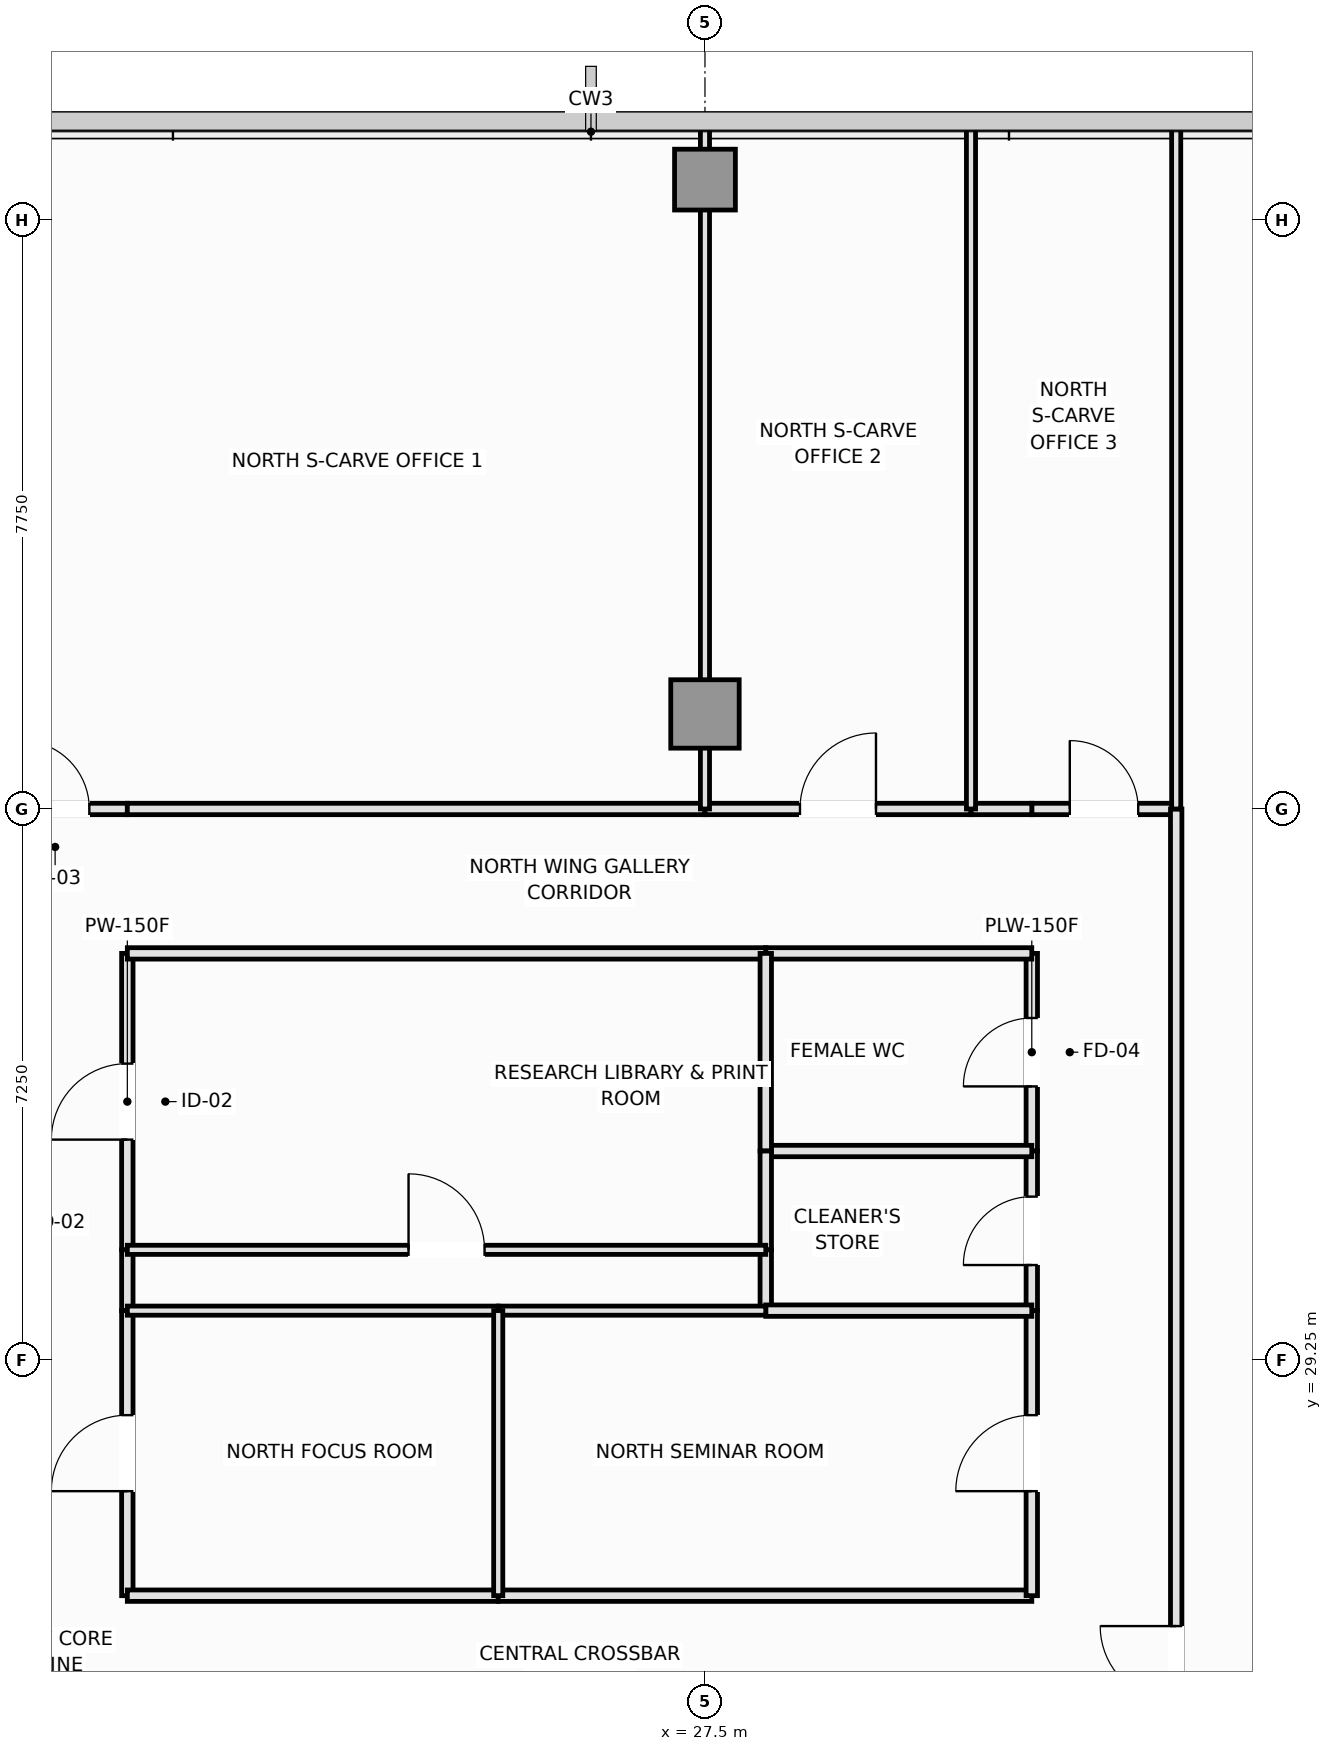
"""IFC4 building model, lengths in metres.
Left out: names, types, materials, properties, quantities, classifications, styles, units other than length and angle.
Written with IfcOpenShell. Run it as: python <this file> out.ifc"""

import sys

from ifc_helpers import new_model, si_unit, direction, frame, frame_2d, origin, origin_2d, place, context, subcontext, project, spatial, rectangle, extrude, element, fill, save


model = new_model("IFC4")
c1 = context("Model", 3, precision=1e-05, world=origin(), true_north=direction((0.0, 1.0)))
c2 = subcontext(c1, "Body", "Model", "MODEL_VIEW")
j1 = project(units=[si_unit("LENGTHUNIT", "METRE"), si_unit("PLANEANGLEUNIT", "RADIAN")], contexts=[c1])
p1 = place(None, origin())
s1 = spatial("IfcSite", under=j1, at=p1, CompositionType="ELEMENT")
p2 = place(p1, origin())
s2 = spatial("IfcBuilding", under=s1, at=p2, CompositionType="ELEMENT")
p3 = place(p2, frame((0.0, 0.0, 212.9)))
s3 = spatial("IfcBuildingStorey", under=s2, at=p3, CompositionType="ELEMENT", Elevation=212.9)
p4 = place(p3, frame((27.5, 37.75, 0.0), z_axis=(0.0, 0.0, 1.0), x_axis=(1.0, 0.0, 0.0)))
e1 = element("IfcColumn", 1, at=p4, inside=s3, PredefinedType="COLUMN", context=c2, shape_type="SweptSolid", body=[
    extrude(rectangle(XDim=0.9, YDim=0.9, at=origin_2d()), origin(), (0.0, 0.0, 1.0), 3.55),
])
p5 = place(p3, frame((27.5, 44.78, 0.0), z_axis=(0.0, 0.0, 1.0), x_axis=(1.0, 0.0, 0.0)))
e2 = element("IfcColumn", 2, at=p5, inside=s3, PredefinedType="COLUMN", context=c2, shape_type="SweptSolid", body=[
    extrude(rectangle(XDim=0.8, YDim=0.8, at=origin_2d()), origin(), (0.0, 0.0, 1.0), 3.55),
])
p6 = place(p3, frame((19.9, 30.7, 0.0), z_axis=(0.0, 0.0, 1.0), x_axis=(0.0, 1.0, 0.0)))
e3 = element("IfcWall", 3, at=p6, inside=s3, PredefinedType="PARTITIONING", context=c2, shape_type="SweptSolid", body=[
    extrude(rectangle(XDim=3.9, YDim=0.15, at=frame_2d((1.95, 0.0))), origin(), (0.0, 0.0, 1.0), 3.37),
])
p7 = place(p6, frame((1.45, 0.0, 0.0)))
e4 = element("IfcOpeningElement", 4, at=p7, cuts=e3, PredefinedType="OPENING", context=c2, shape_type="SweptSolid", body=[
    extrude(rectangle(XDim=1.0, YDim=2.15, at=frame_2d((0.5, 1.075))), frame((0.0, 0.085, 0.0), z_axis=(0.0, -1.0, 0.0), x_axis=(1.0, 0.0, 0.0)), (0.0, 0.0, 1.0), 0.17),
])
p8 = place(p3, frame((19.9, 29.9, 0.0), z_axis=(0.0, 0.0, 1.0), x_axis=(0.0, 1.0, 0.0)))
e5 = element("IfcWall", 5, at=p8, inside=s3, PredefinedType="PARTITIONING", context=c2, shape_type="SweptSolid", body=[
    extrude(rectangle(XDim=0.8, YDim=0.15, at=frame_2d((0.4, 0.0))), origin(), (0.0, 0.0, 1.0), 3.37),
])
p9 = place(p3, frame((19.9, 26.15, 0.0), z_axis=(0.0, 0.0, 1.0), x_axis=(0.0, 1.0, 0.0)))
e6 = element("IfcWall", 6, at=p9, inside=s3, PredefinedType="PARTITIONING", context=c2, shape_type="SweptSolid", body=[
    extrude(rectangle(XDim=3.75, YDim=0.15, at=frame_2d((1.875, 0.0))), origin(), (0.0, 0.0, 1.0), 3.37),
])
p10 = place(p9, frame((1.375, 0.0, 0.0)))
e7 = element("IfcOpeningElement", 7, at=p10, cuts=e6, PredefinedType="OPENING", context=c2, shape_type="SweptSolid", body=[
    extrude(rectangle(XDim=1.0, YDim=2.15, at=frame_2d((0.5, 1.075))), frame((0.0, 0.085, 0.0), z_axis=(0.0, -1.0, 0.0), x_axis=(1.0, 0.0, 0.0)), (0.0, 0.0, 1.0), 0.17),
])
p11 = place(p3, frame((18.0, 36.5, 0.0), z_axis=(0.0, 0.0, 1.0), x_axis=(1.0, 0.0, 0.0)))
e8 = element("IfcWall", 8, at=p11, inside=s3, PredefinedType="PARTITIONING", context=c2, shape_type="SweptSolid", body=[
    extrude(rectangle(XDim=1.9, YDim=0.15, at=frame_2d((0.95, 0.0))), origin(), (0.0, 0.0, 1.0), 3.37),
])
p12 = place(p11, frame((0.5, 0.0, 0.0)))
e9 = element("IfcOpeningElement", 9, at=p12, cuts=e8, PredefinedType="OPENING", context=c2, shape_type="SweptSolid", body=[
    extrude(rectangle(XDim=0.9, YDim=2.1, at=frame_2d((0.45, 1.05))), frame((0.0, 0.085, 0.0), z_axis=(0.0, -1.0, 0.0), x_axis=(1.0, 0.0, 0.0)), (0.0, 0.0, 1.0), 0.17),
])
p13 = place(p3, frame((19.9, 26.15, 0.0), z_axis=(0.0, 0.0, 1.0), x_axis=(1.0, 0.0, 0.0)))
e10 = element("IfcWall", 10, at=p13, inside=s3, PredefinedType="PARTITIONING", context=c2, shape_type="SweptSolid", body=[
    extrude(rectangle(XDim=4.88, YDim=0.15, at=frame_2d((2.44, 0.0))), origin(), (0.0, 0.0, 1.0), 3.37),
])
p14 = place(p3, frame((24.78, 26.15, 0.0), z_axis=(0.0, 0.0, 1.0), x_axis=(1.0, 0.0, 0.0)))
e11 = element("IfcWall", 11, at=p14, inside=s3, PredefinedType="PARTITIONING", context=c2, shape_type="SweptSolid", body=[
    extrude(rectangle(XDim=7.02, YDim=0.15, at=frame_2d((3.51, 0.0))), origin(), (0.0, 0.0, 1.0), 3.37),
])
p15 = place(p3, frame((31.8, 32.0, 0.0), z_axis=(0.0, 0.0, 1.0), x_axis=(0.0, 1.0, 0.0)))
e12 = element("IfcWall", 12, at=p15, inside=s3, PredefinedType="PLUMBINGWALL", context=c2, shape_type="SweptSolid", body=[
    extrude(rectangle(XDim=2.6, YDim=0.15, at=frame_2d((1.3, 0.0))), origin(), (0.0, 0.0, 1.0), 3.37),
])
p16 = place(p15, frame((0.85, 0.0, 0.0)))
e13 = element("IfcOpeningElement", 13, at=p16, cuts=e12, PredefinedType="OPENING", context=c2, shape_type="SweptSolid", body=[
    extrude(rectangle(XDim=0.9, YDim=2.1, at=frame_2d((0.45, 1.05))), frame((0.0, 0.085, 0.0), z_axis=(0.0, -1.0, 0.0), x_axis=(1.0, 0.0, 0.0)), (0.0, 0.0, 1.0), 0.17),
])
p17 = place(p3, frame((31.8, 29.9, 0.0), z_axis=(0.0, 0.0, 1.0), x_axis=(0.0, 1.0, 0.0)))
e14 = element("IfcWall", 14, at=p17, inside=s3, PredefinedType="PLUMBINGWALL", context=c2, shape_type="SweptSolid", body=[
    extrude(rectangle(XDim=2.1, YDim=0.15, at=frame_2d((1.05, 0.0))), origin(), (0.0, 0.0, 1.0), 3.37),
])
p18 = place(p17, frame((0.6, 0.0, 0.0)))
e15 = element("IfcOpeningElement", 15, at=p18, cuts=e14, PredefinedType="OPENING", context=c2, shape_type="SweptSolid", body=[
    extrude(rectangle(XDim=0.9, YDim=2.1, at=frame_2d((0.45, 1.05))), frame((0.0, 0.085, 0.0), z_axis=(0.0, -1.0, 0.0), x_axis=(1.0, 0.0, 0.0)), (0.0, 0.0, 1.0), 0.17),
])
p19 = place(p3, frame((31.8, 26.15, 0.0), z_axis=(0.0, 0.0, 1.0), x_axis=(0.0, 1.0, 0.0)))
e16 = element("IfcWall", 16, at=p19, inside=s3, PredefinedType="PARTITIONING", context=c2, shape_type="SweptSolid", body=[
    extrude(rectangle(XDim=3.75, YDim=0.15, at=frame_2d((1.875, 0.0))), origin(), (0.0, 0.0, 1.0), 3.37),
])
p20 = place(p19, frame((1.375, 0.0, 0.0)))
e17 = element("IfcOpeningElement", 17, at=p20, cuts=e16, PredefinedType="OPENING", context=c2, shape_type="SweptSolid", body=[
    extrude(rectangle(XDim=1.0, YDim=2.15, at=frame_2d((0.5, 1.075))), frame((0.0, 0.085, 0.0), z_axis=(0.0, -1.0, 0.0), x_axis=(1.0, 0.0, 0.0)), (0.0, 0.0, 1.0), 0.17),
])
p21 = place(p3, frame((31.8, 36.5, 0.0), z_axis=(0.0, 0.0, 1.0), x_axis=(1.0, 0.0, 0.0)))
e18 = element("IfcWall", 18, at=p21, inside=s3, PredefinedType="PARTITIONING", context=c2, shape_type="SweptSolid", body=[
    extrude(rectangle(XDim=1.9, YDim=0.15, at=frame_2d((0.95, 0.0))), origin(), (0.0, 0.0, 1.0), 3.37),
])
p22 = place(p21, frame((0.5, 0.0, 0.0)))
e19 = element("IfcOpeningElement", 19, at=p22, cuts=e18, PredefinedType="OPENING", context=c2, shape_type="SweptSolid", body=[
    extrude(rectangle(XDim=0.9, YDim=2.1, at=frame_2d((0.45, 1.05))), frame((0.0, 0.085, 0.0), z_axis=(0.0, -1.0, 0.0), x_axis=(1.0, 0.0, 0.0)), (0.0, 0.0, 1.0), 0.17),
])
p23 = place(p3, frame((33.7, 14.0, 0.0), z_axis=(0.0, 0.0, 1.0), x_axis=(0.0, 1.0, 0.0)))
e20 = element("IfcWall", 20, at=p23, inside=s3, PredefinedType="PARTITIONING", context=c2, shape_type="SweptSolid", body=[
    extrude(rectangle(XDim=22.5, YDim=0.15, at=frame_2d((11.25, 0.0))), origin(), (0.0, 0.0, 1.0), 3.37),
])
p24 = place(p23, frame((10.75, 0.0, 0.0)))
e21 = element("IfcOpeningElement", 21, at=p24, cuts=e20, PredefinedType="OPENING", context=c2, shape_type="SweptSolid", body=[
    extrude(rectangle(XDim=1.0, YDim=2.15, at=frame_2d((0.5, 1.075))), frame((0.0, 0.085, 0.0), z_axis=(0.0, -1.0, 0.0), x_axis=(1.0, 0.0, 0.0)), (0.0, 0.0, 1.0), 0.17),
])
p25 = place(p3, frame((28.3, 34.6, 0.0), z_axis=(0.0, 0.0, 1.0), x_axis=(1.0, 0.0, 0.0)))
e22 = element("IfcWall", 22, at=p25, inside=s3, PredefinedType="PLUMBINGWALL", context=c2, shape_type="SweptSolid", body=[
    extrude(rectangle(XDim=3.5, YDim=0.15, at=frame_2d((1.75, 0.0))), origin(), (0.0, 0.0, 1.0), 3.37),
])
p26 = place(p3, frame((19.9, 34.6, 0.0), z_axis=(0.0, 0.0, 1.0), x_axis=(1.0, 0.0, 0.0)))
e23 = element("IfcWall", 23, at=p26, inside=s3, PredefinedType="PARTITIONING", context=c2, shape_type="SweptSolid", body=[
    extrude(rectangle(XDim=8.4, YDim=0.15, at=frame_2d((4.2, 0.0))), origin(), (0.0, 0.0, 1.0), 3.37),
])
p27 = place(p3, frame((19.9, 36.5, 0.0), z_axis=(0.0, 0.0, 1.0), x_axis=(1.0, 0.0, 0.0)))
e24 = element("IfcWall", 24, at=p27, inside=s3, PredefinedType="PARTITIONING", context=c2, shape_type="SweptSolid", body=[
    extrude(rectangle(XDim=7.6, YDim=0.15, at=frame_2d((3.8, 0.0))), origin(), (0.0, 0.0, 1.0), 3.37),
])
p28 = place(p3, frame((27.5, 36.5, 0.0), z_axis=(0.0, 0.0, 1.0), x_axis=(1.0, 0.0, 0.0)))
e25 = element("IfcWall", 25, at=p28, inside=s3, PredefinedType="PARTITIONING", context=c2, shape_type="SweptSolid", body=[
    extrude(rectangle(XDim=3.5, YDim=0.15, at=frame_2d((1.75, 0.0))), origin(), (0.0, 0.0, 1.0), 3.37),
])
p29 = place(p28, frame((1.25, 0.0, 0.0)))
e26 = element("IfcOpeningElement", 26, at=p29, cuts=e25, PredefinedType="OPENING", context=c2, shape_type="SweptSolid", body=[
    extrude(rectangle(XDim=1.0, YDim=2.15, at=frame_2d((0.5, 1.075))), frame((0.0, 0.085, 0.0), z_axis=(0.0, -1.0, 0.0), x_axis=(1.0, 0.0, 0.0)), (0.0, 0.0, 1.0), 0.17),
])
p30 = place(p3, frame((31.0, 36.5, 0.0), z_axis=(0.0, 0.0, 1.0), x_axis=(1.0, 0.0, 0.0)))
e27 = element("IfcWall", 27, at=p30, inside=s3, PredefinedType="PARTITIONING", context=c2, shape_type="SweptSolid", body=[
    extrude(rectangle(XDim=0.8, YDim=0.15, at=frame_2d((0.4, 0.0))), origin(), (0.0, 0.0, 1.0), 3.37),
])
p31 = place(p3, frame((28.3, 32.0, 0.0), z_axis=(0.0, 0.0, 1.0), x_axis=(1.0, 0.0, 0.0)))
e28 = element("IfcWall", 28, at=p31, inside=s3, PredefinedType="PLUMBINGWALL", context=c2, shape_type="SweptSolid", body=[
    extrude(rectangle(XDim=3.5, YDim=0.15, at=frame_2d((1.75, 0.0))), origin(), (0.0, 0.0, 1.0), 2.87),
])
p32 = place(p3, frame((28.3, 32.0, 0.0), z_axis=(0.0, 0.0, 1.0), x_axis=(0.0, 1.0, 0.0)))
e29 = element("IfcWall", 29, at=p32, inside=s3, PredefinedType="PLUMBINGWALL", context=c2, shape_type="SweptSolid", body=[
    extrude(rectangle(XDim=2.6, YDim=0.15, at=frame_2d((1.3, 0.0))), origin(), (0.0, 0.0, 1.0), 3.37),
])
p33 = place(p3, frame((28.3, 30.7, 0.0), z_axis=(0.0, 0.0, 1.0), x_axis=(0.0, 1.0, 0.0)))
e30 = element("IfcWall", 30, at=p33, inside=s3, PredefinedType="PLUMBINGWALL", context=c2, shape_type="SweptSolid", body=[
    extrude(rectangle(XDim=1.3, YDim=0.15, at=frame_2d((0.65, 0.0))), origin(), (0.0, 0.0, 1.0), 3.37),
])
p34 = place(p3, frame((28.3, 29.9, 0.0), z_axis=(0.0, 0.0, 1.0), x_axis=(0.0, 1.0, 0.0)))
e31 = element("IfcWall", 31, at=p34, inside=s3, PredefinedType="PLUMBINGWALL", context=c2, shape_type="SweptSolid", body=[
    extrude(rectangle(XDim=0.8, YDim=0.15, at=frame_2d((0.4, 0.0))), origin(), (0.0, 0.0, 1.0), 3.37),
])
p35 = place(p3, frame((28.3, 29.9, 0.0), z_axis=(0.0, 0.0, 1.0), x_axis=(1.0, 0.0, 0.0)))
e32 = element("IfcWall", 32, at=p35, inside=s3, PredefinedType="PLUMBINGWALL", context=c2, shape_type="SweptSolid", body=[
    extrude(rectangle(XDim=3.5, YDim=0.15, at=frame_2d((1.75, 0.0))), origin(), (0.0, 0.0, 1.0), 3.37),
])
p36 = place(p3, frame((19.9, 30.7, 0.0), z_axis=(0.0, 0.0, 1.0), x_axis=(1.0, 0.0, 0.0)))
e33 = element("IfcWall", 33, at=p36, inside=s3, PredefinedType="PARTITIONING", context=c2, shape_type="SweptSolid", body=[
    extrude(rectangle(XDim=8.4, YDim=0.12, at=frame_2d((4.2, 0.0))), origin(), (0.0, 0.0, 1.0), 3.37),
])
p37 = place(p36, frame((3.7, 0.0, 0.0)))
e34 = element("IfcOpeningElement", 34, at=p37, cuts=e33, PredefinedType="OPENING", context=c2, shape_type="SweptSolid", body=[
    extrude(rectangle(XDim=1.0, YDim=2.15, at=frame_2d((0.5, 1.075))), frame((0.0, 0.07, 0.0), z_axis=(0.0, -1.0, 0.0), x_axis=(1.0, 0.0, 0.0)), (0.0, 0.0, 1.0), 0.14),
])
p38 = place(p3, frame((19.9, 29.9, 0.0), z_axis=(0.0, 0.0, 1.0), x_axis=(1.0, 0.0, 0.0)))
e35 = element("IfcWall", 35, at=p38, inside=s3, PredefinedType="PARTITIONING", context=c2, shape_type="SweptSolid", body=[
    extrude(rectangle(XDim=4.88, YDim=0.12, at=frame_2d((2.44, 0.0))), origin(), (0.0, 0.0, 1.0), 3.37),
])
p39 = place(p3, frame((24.78, 29.9, 0.0), z_axis=(0.0, 0.0, 1.0), x_axis=(1.0, 0.0, 0.0)))
e36 = element("IfcWall", 36, at=p39, inside=s3, PredefinedType="PARTITIONING", context=c2, shape_type="SweptSolid", body=[
    extrude(rectangle(XDim=3.52, YDim=0.12, at=frame_2d((1.76, 0.0))), origin(), (0.0, 0.0, 1.0), 3.37),
])
p40 = place(p3, frame((24.78, 26.15, 0.0), z_axis=(0.0, 0.0, 1.0), x_axis=(0.0, 1.0, 0.0)))
e37 = element("IfcWall", 37, at=p40, inside=s3, PredefinedType="PARTITIONING", context=c2, shape_type="SweptSolid", body=[
    extrude(rectangle(XDim=3.75, YDim=0.12, at=frame_2d((1.875, 0.0))), origin(), (0.0, 0.0, 1.0), 3.37),
])
p41 = place(p3, frame((27.5, 36.5, 0.0), z_axis=(0.0, 0.0, 1.0), x_axis=(0.0, 1.0, 0.0)))
e38 = element("IfcWall", 38, at=p41, inside=s3, PredefinedType="PARTITIONING", context=c2, shape_type="SweptSolid", body=[
    extrude(rectangle(XDim=8.99, YDim=0.12, at=frame_2d((4.495, 0.0))), origin(), (0.0, 0.0, 1.0), 2.92),
])
for number, where, z_axis, x_axis in (
    (39, (31.0, 36.5, 0.0), (0.0, 0.0, 1.0), (0.0, 1.0, 0.0)),
    (40, (33.7, 36.5, 0.0), (0.0, 0.0, 1.0), (0.0, 1.0, 0.0)),
):
    element("IfcWall", number, at=place(p3, frame(where, z_axis=z_axis, x_axis=x_axis)), inside=s3, PredefinedType="PARTITIONING", context=c2, shape_type="SweptSolid", body=[
        extrude(rectangle(XDim=8.99, YDim=0.12, at=frame_2d((4.495, 0.0))), origin(), (0.0, 0.0, 1.0), 3.37),
    ])
p42 = place(p7, origin())
e41 = element("IfcDoor", 41, at=p42, inside=s3, OperationType="SINGLE_SWING_LEFT", PredefinedType="DOOR", context=c2, shape_type="SweptSolid", body=[
    extrude(rectangle(XDim=1.0, YDim=2.15, at=frame_2d((0.5, 1.075))), frame((0.0, 0.025, 0.0), z_axis=(0.0, -1.0, 0.0), x_axis=(1.0, 0.0, 0.0)), (0.0, 0.0, 1.0), 0.05),
])
fill(e4, e41)
p43 = place(p10, origin())
e42 = element("IfcDoor", 42, at=p43, inside=s3, OperationType="SINGLE_SWING_LEFT", PredefinedType="DOOR", context=c2, shape_type="SweptSolid", body=[
    extrude(rectangle(XDim=1.0, YDim=2.15, at=frame_2d((0.5, 1.075))), frame((0.0, 0.025, 0.0), z_axis=(0.0, -1.0, 0.0), x_axis=(1.0, 0.0, 0.0)), (0.0, 0.0, 1.0), 0.05),
])
fill(e7, e42)
p44 = place(p12, origin())
e43 = element("IfcDoor", 43, at=p44, inside=s3, OperationType="SINGLE_SWING_LEFT", PredefinedType="DOOR", context=c2, shape_type="SweptSolid", body=[
    extrude(rectangle(XDim=0.9, YDim=2.1, at=frame_2d((0.45, 1.05))), frame((0.0, 0.025, 0.0), z_axis=(0.0, -1.0, 0.0), x_axis=(1.0, 0.0, 0.0)), (0.0, 0.0, 1.0), 0.05),
])
fill(e9, e43)
p45 = place(p16, origin())
e44 = element("IfcDoor", 44, at=p45, inside=s3, OperationType="SINGLE_SWING_LEFT", PredefinedType="DOOR", context=c2, shape_type="SweptSolid", body=[
    extrude(rectangle(XDim=0.9, YDim=2.1, at=frame_2d((0.45, 1.05))), frame((0.0, 0.025, 0.0), z_axis=(0.0, -1.0, 0.0), x_axis=(1.0, 0.0, 0.0)), (0.0, 0.0, 1.0), 0.05),
])
fill(e13, e44)
p46 = place(p18, origin())
e45 = element("IfcDoor", 45, at=p46, inside=s3, OperationType="SINGLE_SWING_LEFT", PredefinedType="DOOR", context=c2, shape_type="SweptSolid", body=[
    extrude(rectangle(XDim=0.9, YDim=2.1, at=frame_2d((0.45, 1.05))), frame((0.0, 0.025, 0.0), z_axis=(0.0, -1.0, 0.0), x_axis=(1.0, 0.0, 0.0)), (0.0, 0.0, 1.0), 0.05),
])
fill(e15, e45)
p47 = place(p20, origin())
e46 = element("IfcDoor", 46, at=p47, inside=s3, OperationType="SINGLE_SWING_LEFT", PredefinedType="DOOR", context=c2, shape_type="SweptSolid", body=[
    extrude(rectangle(XDim=1.0, YDim=2.15, at=frame_2d((0.5, 1.075))), frame((0.0, 0.025, 0.0), z_axis=(0.0, -1.0, 0.0), x_axis=(1.0, 0.0, 0.0)), (0.0, 0.0, 1.0), 0.05),
])
fill(e17, e46)
p48 = place(p22, origin())
e47 = element("IfcDoor", 47, at=p48, inside=s3, OperationType="SINGLE_SWING_LEFT", PredefinedType="DOOR", context=c2, shape_type="SweptSolid", body=[
    extrude(rectangle(XDim=0.9, YDim=2.1, at=frame_2d((0.45, 1.05))), frame((0.0, 0.025, 0.0), z_axis=(0.0, -1.0, 0.0), x_axis=(1.0, 0.0, 0.0)), (0.0, 0.0, 1.0), 0.05),
])
fill(e19, e47)
p49 = place(p24, origin())
e48 = element("IfcDoor", 48, at=p49, inside=s3, OperationType="SINGLE_SWING_RIGHT", PredefinedType="DOOR", context=c2, shape_type="SweptSolid", body=[
    extrude(rectangle(XDim=1.0, YDim=2.15, at=frame_2d((0.5, 1.075))), frame((0.0, 0.025, 0.0), z_axis=(0.0, -1.0, 0.0), x_axis=(1.0, 0.0, 0.0)), (0.0, 0.0, 1.0), 0.05),
])
fill(e21, e48)
p50 = place(p29, origin())
e49 = element("IfcDoor", 49, at=p50, inside=s3, OperationType="SINGLE_SWING_RIGHT", PredefinedType="DOOR", context=c2, shape_type="SweptSolid", body=[
    extrude(rectangle(XDim=1.0, YDim=2.15, at=frame_2d((0.5, 1.075))), frame((0.0, 0.025, 0.0), z_axis=(0.0, -1.0, 0.0), x_axis=(1.0, 0.0, 0.0)), (0.0, 0.0, 1.0), 0.05),
])
fill(e26, e49)
p51 = place(p37, origin())
e50 = element("IfcDoor", 50, at=p51, inside=s3, OperationType="SINGLE_SWING_LEFT", PredefinedType="DOOR", context=c2, shape_type="SweptSolid", body=[
    extrude(rectangle(XDim=1.0, YDim=2.15, at=frame_2d((0.5, 1.075))), frame((0.0, 0.025, 0.0), z_axis=(0.0, -1.0, 0.0), x_axis=(1.0, 0.0, 0.0)), (0.0, 0.0, 1.0), 0.05),
])
fill(e34, e50)
save(model, sys.argv[1])
